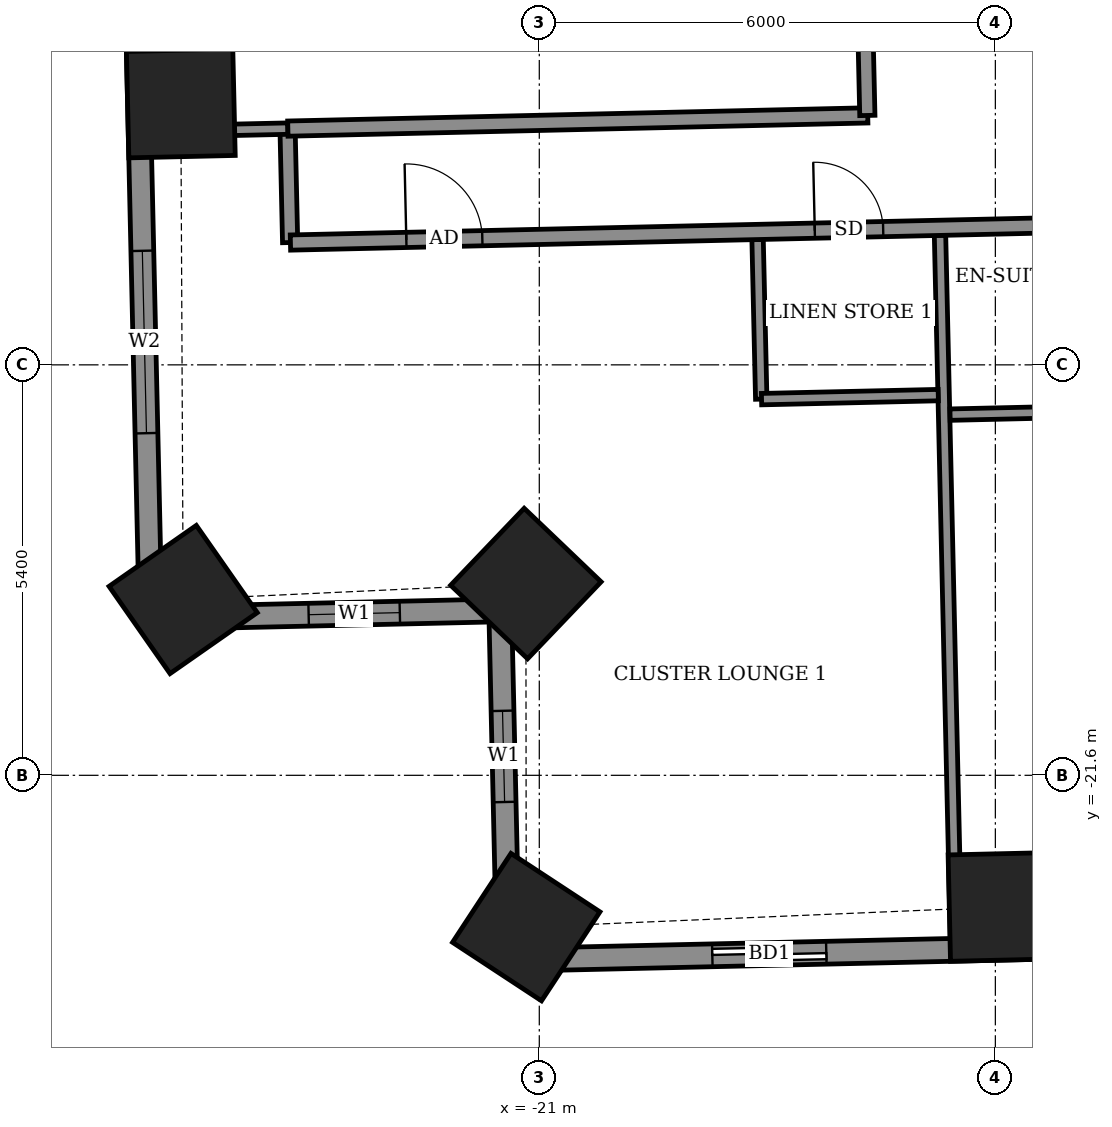
"""IFC4 building model, lengths in metres.
Left out: names, types, materials, properties, quantities, classifications, styles, units other than length and angle.
Written with IfcOpenShell. Run it as: python <this file> out.ifc"""

import sys

from ifc_helpers import new_model, si_unit, direction, frame, frame_2d, origin, origin_2d, place, context, subcontext, project, spatial, rectangle, extrude, element, fill, save


model = new_model("IFC4")
c1 = context("Model", 3, precision=1e-05, world=origin(), true_north=direction((0.0, 1.0)))
c2 = subcontext(c1, "Body", "Model", "MODEL_VIEW")
j1 = project(units=[si_unit("LENGTHUNIT", "METRE"), si_unit("PLANEANGLEUNIT", "RADIAN")], contexts=[c1])
p1 = place(None, origin())
s1 = spatial("IfcSite", under=j1, at=p1, CompositionType="ELEMENT")
p2 = place(p1, origin())
s2 = spatial("IfcBuilding", under=s1, at=p2, CompositionType="ELEMENT")
p3 = place(p2, frame((0.0, 0.0, 90.1)))
s3 = spatial("IfcBuildingStorey", under=s2, at=p3, CompositionType="ELEMENT", Elevation=90.1)
for number, where, z_axis, x_axis in (
    (1, (-25.716, -12.761, -0.55), (0.0, 0.0, 1.0), (0.023, -1.0, 0.0)),
    (2, (-25.685, -19.287, -0.55), (0.0, 0.0, 1.0), (0.573, -0.82, 0.0)),
    (3, (-21.177, -19.077, -0.55), (0.0, 0.0, 1.0), (0.723, -0.691, 0.0)),
    (4, (-21.172, -23.597, -0.55), (0.0, 0.0, 1.0), (0.836, -0.549, 0.0)),
    (5, (-14.906, -23.331, -0.55), (0.0, 0.0, 1.0), (1.0, 0.023, 0.0)),
):
    element("IfcColumn", number, at=place(p3, frame(where, z_axis=z_axis, x_axis=x_axis)), inside=s3, PredefinedType="COLUMN", context=c2, shape_type="SweptSolid", body=[
        extrude(rectangle(XDim=1.4, YDim=1.4, at=origin_2d()), origin(), (0.0, 0.0, 1.0), 3.6),
    ])
p4 = place(p3, frame((-26.424, -5.808, 0.0), z_axis=(0.0, 0.0, 1.0), x_axis=(0.022654755793, -0.999743348085, 0.0)))
e6 = element("IfcWall", 6, at=p4, inside=s3, PredefinedType="SOLIDWALL", context=c2, shape_type="SweptSolid", body=[
    extrude(rectangle(XDim=13.729, YDim=0.3, at=frame_2d((6.865, 0.0))), origin(), (0.0, 0.0, 1.0), 3.05),
])
p5 = place(p4, frame((2.761, 0.0, 0.0)))
e7 = element("IfcOpeningElement", 7, at=p5, cuts=e6, PredefinedType="OPENING", context=c2, shape_type="SweptSolid", body=[
    extrude(rectangle(XDim=1.5, YDim=2.4, at=frame_2d((0.75, 1.2))), frame((0.0, 0.16, 0.0), z_axis=(0.0, -1.0, 0.0), x_axis=(1.0, 0.0, 0.0)), (0.0, 0.0, 1.0), 0.32),
])
p6 = place(p4, frame((8.894, 0.0, 0.9)))
e8 = element("IfcOpeningElement", 8, at=p6, cuts=e6, PredefinedType="OPENING", context=c2, shape_type="SweptSolid", body=[
    extrude(rectangle(XDim=2.4, YDim=1.5, at=frame_2d((1.2, 0.75))), frame((0.0, 0.16, 0.0), z_axis=(0.0, -1.0, 0.0), x_axis=(1.0, 0.0, 0.0)), (0.0, 0.0, 1.0), 0.32),
])
p7 = place(p3, frame((-26.113, -19.534, 0.0), z_axis=(0.0, 0.0, 1.0), x_axis=(0.999744404568, 0.02260808559, 0.0)))
e9 = element("IfcWall", 9, at=p7, inside=s3, PredefinedType="SOLIDWALL", context=c2, shape_type="SweptSolid", body=[
    extrude(rectangle(XDim=4.6, YDim=0.3, at=frame_2d((2.3, 0.0))), origin(), (0.0, 0.0, 1.0), 2.55),
])
p8 = place(p7, frame((2.079, 0.0, 0.9)))
e10 = element("IfcOpeningElement", 10, at=p8, cuts=e9, PredefinedType="OPENING", context=c2, shape_type="SweptSolid", body=[
    extrude(rectangle(XDim=1.2, YDim=1.5, at=frame_2d((0.6, 0.75))), frame((0.0, 0.16, 0.0), z_axis=(0.0, -1.0, 0.0), x_axis=(1.0, 0.0, 0.0)), (0.0, 0.0, 1.0), 0.32),
])
p9 = place(p3, frame((-21.514, -19.43, 0.0), z_axis=(0.0, 0.0, 1.0), x_axis=(0.022820258049, -0.999739584003, 0.0)))
e11 = element("IfcWall", 11, at=p9, inside=s3, PredefinedType="SOLIDWALL", context=c2, shape_type="SweptSolid", body=[
    extrude(rectangle(XDim=4.6, YDim=0.3, at=frame_2d((2.3, 0.0))), origin(), (0.0, 0.0, 1.0), 2.55),
])
p10 = place(p9, frame((1.322, 0.0, 0.9)))
e12 = element("IfcOpeningElement", 12, at=p10, cuts=e11, PredefinedType="OPENING", context=c2, shape_type="SweptSolid", body=[
    extrude(rectangle(XDim=1.2, YDim=1.5, at=frame_2d((0.6, 0.75))), frame((0.0, 0.16, 0.0), z_axis=(0.0, -1.0, 0.0), x_axis=(1.0, 0.0, 0.0)), (0.0, 0.0, 1.0), 0.32),
])
p11 = place(p3, frame((-21.409, -24.029, 0.0), z_axis=(0.0, 0.0, 1.0), x_axis=(0.999742634032, 0.022686244721, 0.0)))
e13 = element("IfcWall", 13, at=p11, inside=s3, PredefinedType="SOLIDWALL", context=c2, shape_type="SweptSolid", body=[
    extrude(rectangle(XDim=46.372, YDim=0.3, at=frame_2d((23.186, 0.0))), origin(), (0.0, 0.0, 1.0), 3.05),
])
p12 = place(p11, frame((2.686, 0.0, 0.0)))
e14 = element("IfcOpeningElement", 14, at=p12, cuts=e13, PredefinedType="OPENING", context=c2, shape_type="SweptSolid", body=[
    extrude(rectangle(XDim=1.5, YDim=2.4, at=frame_2d((0.75, 1.2))), frame((0.0, 0.16, 0.0), z_axis=(0.0, -1.0, 0.0), x_axis=(1.0, 0.0, 0.0)), (0.0, 0.0, 1.0), 0.32),
])
p13 = place(p11, frame((7.959, 0.0, 0.0)))
e15 = element("IfcOpeningElement", 15, at=p13, cuts=e13, PredefinedType="OPENING", context=c2, shape_type="SweptSolid", body=[
    extrude(rectangle(XDim=1.5, YDim=2.4, at=frame_2d((0.75, 1.2))), frame((0.0, 0.16, 0.0), z_axis=(0.0, -1.0, 0.0), x_axis=(1.0, 0.0, 0.0)), (0.0, 0.0, 1.0), 0.32),
])
p14 = place(p11, frame((10.842, 0.0, 0.0)))
e16 = element("IfcOpeningElement", 16, at=p14, cuts=e13, PredefinedType="OPENING", context=c2, shape_type="SweptSolid", body=[
    extrude(rectangle(XDim=1.5, YDim=2.4, at=frame_2d((0.75, 1.2))), frame((0.0, 0.16, 0.0), z_axis=(0.0, -1.0, 0.0), x_axis=(1.0, 0.0, 0.0)), (0.0, 0.0, 1.0), 0.32),
])
p15 = place(p11, frame((16.3, 0.0, 0.0)))
e17 = element("IfcOpeningElement", 17, at=p15, cuts=e13, PredefinedType="OPENING", context=c2, shape_type="SweptSolid", body=[
    extrude(rectangle(XDim=1.5, YDim=2.4, at=frame_2d((0.75, 1.2))), frame((0.0, 0.16, 0.0), z_axis=(0.0, -1.0, 0.0), x_axis=(1.0, 0.0, 0.0)), (0.0, 0.0, 1.0), 0.32),
])
p16 = place(p11, frame((21.326, 0.0, 0.0)))
e18 = element("IfcOpeningElement", 18, at=p16, cuts=e13, PredefinedType="OPENING", context=c2, shape_type="SweptSolid", body=[
    extrude(rectangle(XDim=1.5, YDim=2.4, at=frame_2d((0.75, 1.2))), frame((0.0, 0.16, 0.0), z_axis=(0.0, -1.0, 0.0), x_axis=(1.0, 0.0, 0.0)), (0.0, 0.0, 1.0), 0.32),
])
p17 = place(p11, frame((24.21, 0.0, 0.0)))
e19 = element("IfcOpeningElement", 19, at=p17, cuts=e13, PredefinedType="OPENING", context=c2, shape_type="SweptSolid", body=[
    extrude(rectangle(XDim=1.5, YDim=2.4, at=frame_2d((0.75, 1.2))), frame((0.0, 0.16, 0.0), z_axis=(0.0, -1.0, 0.0), x_axis=(1.0, 0.0, 0.0)), (0.0, 0.0, 1.0), 0.32),
])
p18 = place(p11, frame((29.769, 0.0, 0.0)))
e20 = element("IfcOpeningElement", 20, at=p18, cuts=e13, PredefinedType="OPENING", context=c2, shape_type="SweptSolid", body=[
    extrude(rectangle(XDim=1.5, YDim=2.4, at=frame_2d((0.75, 1.2))), frame((0.0, 0.16, 0.0), z_axis=(0.0, -1.0, 0.0), x_axis=(1.0, 0.0, 0.0)), (0.0, 0.0, 1.0), 0.32),
])
p19 = place(p11, frame((34.819, 0.0, 0.0)))
e21 = element("IfcOpeningElement", 21, at=p19, cuts=e13, PredefinedType="OPENING", context=c2, shape_type="SweptSolid", body=[
    extrude(rectangle(XDim=1.5, YDim=2.4, at=frame_2d((0.75, 1.2))), frame((0.0, 0.16, 0.0), z_axis=(0.0, -1.0, 0.0), x_axis=(1.0, 0.0, 0.0)), (0.0, 0.0, 1.0), 0.32),
])
p20 = place(p11, frame((37.852, 0.0, 0.0)))
e22 = element("IfcOpeningElement", 22, at=p20, cuts=e13, PredefinedType="OPENING", context=c2, shape_type="SweptSolid", body=[
    extrude(rectangle(XDim=1.2, YDim=2.4, at=frame_2d((0.6, 1.2))), frame((0.0, 0.16, 0.0), z_axis=(0.0, -1.0, 0.0), x_axis=(1.0, 0.0, 0.0)), (0.0, 0.0, 1.0), 0.32),
])
p21 = place(p11, frame((42.373, 0.0, 0.9)))
e23 = element("IfcOpeningElement", 23, at=p21, cuts=e13, PredefinedType="OPENING", context=c2, shape_type="SweptSolid", body=[
    extrude(rectangle(XDim=2.4, YDim=1.5, at=frame_2d((1.2, 0.75))), frame((0.0, 0.16, 0.0), z_axis=(0.0, -1.0, 0.0), x_axis=(1.0, 0.0, 0.0)), (0.0, 0.0, 1.0), 0.32),
])
p22 = place(p3, frame((-15.518, -23.745, 0.0), z_axis=(0.0, 0.0, 1.0), x_axis=(-0.022697424684, 0.999742380272, 0.0)))
e24 = element("IfcWall", 24, at=p22, inside=s3, PredefinedType="PARTITIONING", context=c2, shape_type="SweptSolid", body=[
    extrude(rectangle(XDim=9.25, YDim=0.15, at=frame_2d((4.625, 0.0))), origin(), (0.0, 0.0, 1.0), 3.05),
])
p23 = place(p3, frame((-15.596, -16.855, 0.0), z_axis=(0.0, 0.0, 1.0), x_axis=(0.999740478815, 0.022781023197, 0.0)))
e25 = element("IfcWall", 25, at=p23, inside=s3, PredefinedType="PARTITIONING", context=c2, shape_type="SweptSolid", body=[
    extrude(rectangle(XDim=2.325, YDim=0.15, at=frame_2d((1.163, 0.0))), origin(), (0.0, 0.0, 1.0), 3.05),
])
p24 = place(p3, frame((-18.08, -16.651, 0.0), z_axis=(0.0, 0.0, 1.0), x_axis=(-0.022792727877, 0.999740212033, 0.0)))
e26 = element("IfcWall", 26, at=p24, inside=s3, PredefinedType="PARTITIONING", context=c2, shape_type="SweptSolid", body=[
    extrude(rectangle(XDim=2.099, YDim=0.15, at=frame_2d((1.05, 0.0))), origin(), (0.0, 0.0, 1.0), 3.05),
])
p25 = place(p3, frame((-18.076, -16.651, 0.0), z_axis=(0.0, 0.0, 1.0), x_axis=(0.999740478815, 0.022781023197, 0.0)))
e27 = element("IfcWall", 27, at=p25, inside=s3, PredefinedType="PARTITIONING", context=c2, shape_type="SweptSolid", body=[
    extrude(rectangle(XDim=2.325, YDim=0.15, at=frame_2d((1.163, 0.0))), origin(), (0.0, 0.0, 1.0), 3.05),
])
p26 = place(p3, frame((-24.278, -14.591, 0.0), z_axis=(0.0, 0.0, 1.0), x_axis=(-0.022632637625, 0.99974384905, 0.0)))
e28 = element("IfcWall", 28, at=p26, inside=s3, PredefinedType="PARTITIONING", context=c2, shape_type="SweptSolid", body=[
    extrude(rectangle(XDim=1.5, YDim=0.2, at=frame_2d((0.75, 0.0))), origin(), (0.0, 0.0, 1.0), 3.05),
])
p27 = place(p3, frame((-24.274, -14.591, 0.0), z_axis=(0.0, 0.0, 1.0), x_axis=(0.999742718753, 0.022682510909, 0.0)))
e29 = element("IfcWall", 29, at=p27, inside=s3, PredefinedType="PARTITIONING", context=c2, shape_type="SweptSolid", body=[
    extrude(rectangle(XDim=52.471, YDim=0.2, at=frame_2d((26.236, 0.0))), origin(), (0.0, 0.0, 1.0), 3.05),
])
p28 = place(p27, frame((1.525, 0.0, 0.0)))
e30 = element("IfcOpeningElement", 30, at=p28, cuts=e29, PredefinedType="OPENING", context=c2, shape_type="SweptSolid", body=[
    extrude(rectangle(XDim=1.0, YDim=2.1, at=frame_2d((0.5, 1.05))), frame((0.0, 0.11, 0.0), z_axis=(0.0, -1.0, 0.0), x_axis=(1.0, 0.0, 0.0)), (0.0, 0.0, 1.0), 0.22),
])
p29 = place(p27, frame((6.9, 0.0, 0.0)))
e31 = element("IfcOpeningElement", 31, at=p29, cuts=e29, PredefinedType="OPENING", context=c2, shape_type="SweptSolid", body=[
    extrude(rectangle(XDim=0.9, YDim=2.1, at=frame_2d((0.45, 1.05))), frame((0.0, 0.11, 0.0), z_axis=(0.0, -1.0, 0.0), x_axis=(1.0, 0.0, 0.0)), (0.0, 0.0, 1.0), 0.22),
])
p30 = place(p27, frame((11.575, 0.0, 0.0)))
e32 = element("IfcOpeningElement", 32, at=p30, cuts=e29, PredefinedType="OPENING", context=c2, shape_type="SweptSolid", body=[
    extrude(rectangle(XDim=0.9, YDim=2.1, at=frame_2d((0.45, 1.05))), frame((0.0, 0.11, 0.0), z_axis=(0.0, -1.0, 0.0), x_axis=(1.0, 0.0, 0.0)), (0.0, 0.0, 1.0), 0.22),
])
p31 = place(p27, frame((13.6, 0.0, 0.0)))
e33 = element("IfcOpeningElement", 33, at=p31, cuts=e29, PredefinedType="OPENING", context=c2, shape_type="SweptSolid", body=[
    extrude(rectangle(XDim=0.9, YDim=2.1, at=frame_2d((0.45, 1.05))), frame((0.0, 0.11, 0.0), z_axis=(0.0, -1.0, 0.0), x_axis=(1.0, 0.0, 0.0)), (0.0, 0.0, 1.0), 0.22),
])
p32 = place(p27, frame((20.45, 0.0, 0.0)))
e34 = element("IfcOpeningElement", 34, at=p32, cuts=e29, PredefinedType="OPENING", context=c2, shape_type="SweptSolid", body=[
    extrude(rectangle(XDim=0.9, YDim=2.1, at=frame_2d((0.45, 1.05))), frame((0.0, 0.11, 0.0), z_axis=(0.0, -1.0, 0.0), x_axis=(1.0, 0.0, 0.0)), (0.0, 0.0, 1.0), 0.22),
])
p33 = place(p27, frame((22.6, 0.0, 0.0)))
e35 = element("IfcOpeningElement", 35, at=p33, cuts=e29, PredefinedType="OPENING", context=c2, shape_type="SweptSolid", body=[
    extrude(rectangle(XDim=0.9, YDim=2.1, at=frame_2d((0.45, 1.05))), frame((0.0, 0.11, 0.0), z_axis=(0.0, -1.0, 0.0), x_axis=(1.0, 0.0, 0.0)), (0.0, 0.0, 1.0), 0.22),
])
p34 = place(p27, frame((29.475, 0.0, 0.0)))
e36 = element("IfcOpeningElement", 36, at=p34, cuts=e29, PredefinedType="OPENING", context=c2, shape_type="SweptSolid", body=[
    extrude(rectangle(XDim=0.9, YDim=2.1, at=frame_2d((0.45, 1.05))), frame((0.0, 0.11, 0.0), z_axis=(0.0, -1.0, 0.0), x_axis=(1.0, 0.0, 0.0)), (0.0, 0.0, 1.0), 0.22),
])
p35 = place(p27, frame((31.675, 0.0, 0.0)))
e37 = element("IfcOpeningElement", 37, at=p35, cuts=e29, PredefinedType="OPENING", context=c2, shape_type="SweptSolid", body=[
    extrude(rectangle(XDim=0.9, YDim=2.1, at=frame_2d((0.45, 1.05))), frame((0.0, 0.11, 0.0), z_axis=(0.0, -1.0, 0.0), x_axis=(1.0, 0.0, 0.0)), (0.0, 0.0, 1.0), 0.22),
])
p36 = place(p27, frame((38.675, 0.0, 0.0)))
e38 = element("IfcOpeningElement", 38, at=p36, cuts=e29, PredefinedType="OPENING", context=c2, shape_type="SweptSolid", body=[
    extrude(rectangle(XDim=0.9, YDim=2.1, at=frame_2d((0.45, 1.05))), frame((0.0, 0.11, 0.0), z_axis=(0.0, -1.0, 0.0), x_axis=(1.0, 0.0, 0.0)), (0.0, 0.0, 1.0), 0.22),
])
p37 = place(p27, frame((40.675, 0.0, 0.0)))
e39 = element("IfcOpeningElement", 39, at=p37, cuts=e29, PredefinedType="OPENING", context=c2, shape_type="SweptSolid", body=[
    extrude(rectangle(XDim=0.9, YDim=2.1, at=frame_2d((0.45, 1.05))), frame((0.0, 0.11, 0.0), z_axis=(0.0, -1.0, 0.0), x_axis=(1.0, 0.0, 0.0)), (0.0, 0.0, 1.0), 0.22),
])
p38 = place(p27, frame((50.436, 0.0, 0.0)))
e40 = element("IfcOpeningElement", 40, at=p38, cuts=e29, PredefinedType="OPENING", context=c2, shape_type="SweptSolid", body=[
    extrude(rectangle(XDim=1.0, YDim=2.1, at=frame_2d((0.5, 1.05))), frame((0.0, 0.11, 0.0), z_axis=(0.0, -1.0, 0.0), x_axis=(1.0, 0.0, 0.0)), (0.0, 0.0, 1.0), 0.22),
])
p39 = place(p27, frame((45.45, 0.0, 0.0)))
e41 = element("IfcOpeningElement", 41, at=p39, cuts=e29, PredefinedType="OPENING", context=c2, shape_type="SweptSolid", body=[
    extrude(rectangle(XDim=0.9, YDim=2.1, at=frame_2d((0.45, 1.05))), frame((0.0, 0.11, 0.0), z_axis=(0.0, -1.0, 0.0), x_axis=(1.0, 0.0, 0.0)), (0.0, 0.0, 1.0), 0.22),
])
p40 = place(p3, frame((-26.108, -13.132, 0.0), z_axis=(0.0, 0.0, 1.0), x_axis=(0.999752642043, 0.022240834685, 0.0)))
e42 = element("IfcWall", 42, at=p40, inside=s3, PredefinedType="PARTITIONING", context=c2, shape_type="SweptSolid", body=[
    extrude(rectangle(XDim=1.8, YDim=0.15, at=frame_2d((0.9, 0.0))), origin(), (0.0, 0.0, 1.0), 3.05),
])
p41 = place(p3, frame((-24.308, -13.092, 0.0), z_axis=(0.0, 0.0, 1.0), x_axis=(0.999739800004, 0.022810793222, 0.0)))
e43 = element("IfcWall", 43, at=p41, inside=s3, PredefinedType="PARTITIONING", context=c2, shape_type="SweptSolid", body=[
    extrude(rectangle(XDim=7.631, YDim=0.2, at=frame_2d((3.815, 0.0))), origin(), (0.0, 0.0, 1.0), 3.05),
])
p42 = place(p3, frame((-16.684, -12.919, 0.0), z_axis=(0.0, 0.0, 1.0), x_axis=(-0.022706151961, 0.999742182097, 0.0)))
e44 = element("IfcWall", 44, at=p42, inside=s3, PredefinedType="PARTITIONING", context=c2, shape_type="SweptSolid", body=[
    extrude(rectangle(XDim=25.45, YDim=0.2, at=frame_2d((12.725, 0.0))), origin(), (0.0, 0.0, 1.0), 3.05),
])
p43 = place(p42, frame((23.938, 0.0, 0.0)))
e45 = element("IfcOpeningElement", 45, at=p43, cuts=e44, PredefinedType="OPENING", context=c2, shape_type="SweptSolid", body=[
    extrude(rectangle(XDim=1.0, YDim=2.1, at=frame_2d((0.5, 1.05))), frame((0.0, 0.11, 0.0), z_axis=(0.0, -1.0, 0.0), x_axis=(1.0, 0.0, 0.0)), (0.0, 0.0, 1.0), 0.22),
])
p44 = place(p42, frame((21.775, 0.0, 0.0)))
e46 = element("IfcOpeningElement", 46, at=p44, cuts=e44, PredefinedType="OPENING", context=c2, shape_type="SweptSolid", body=[
    extrude(rectangle(XDim=0.9, YDim=2.1, at=frame_2d((0.45, 1.05))), frame((0.0, 0.11, 0.0), z_axis=(0.0, -1.0, 0.0), x_axis=(1.0, 0.0, 0.0)), (0.0, 0.0, 1.0), 0.22),
])
p45 = place(p42, frame((16.975, 0.0, 0.0)))
e47 = element("IfcOpeningElement", 47, at=p45, cuts=e44, PredefinedType="OPENING", context=c2, shape_type="SweptSolid", body=[
    extrude(rectangle(XDim=1.0, YDim=2.1, at=frame_2d((0.5, 1.05))), frame((0.0, 0.11, 0.0), z_axis=(0.0, -1.0, 0.0), x_axis=(1.0, 0.0, 0.0)), (0.0, 0.0, 1.0), 0.22),
])
p46 = place(p42, frame((19.275, 0.0, 0.0)))
e48 = element("IfcOpeningElement", 48, at=p46, cuts=e44, PredefinedType="OPENING", context=c2, shape_type="SweptSolid", body=[
    extrude(rectangle(XDim=0.9, YDim=2.1, at=frame_2d((0.45, 1.05))), frame((0.0, 0.11, 0.0), z_axis=(0.0, -1.0, 0.0), x_axis=(1.0, 0.0, 0.0)), (0.0, 0.0, 1.0), 0.22),
])
p47 = place(p42, frame((15.075, 0.0, 0.0)))
e49 = element("IfcOpeningElement", 49, at=p47, cuts=e44, PredefinedType="OPENING", context=c2, shape_type="SweptSolid", body=[
    extrude(rectangle(XDim=1.0, YDim=2.1, at=frame_2d((0.5, 1.05))), frame((0.0, 0.11, 0.0), z_axis=(0.0, -1.0, 0.0), x_axis=(1.0, 0.0, 0.0)), (0.0, 0.0, 1.0), 0.22),
])
p48 = place(p42, frame((12.975, 0.0, 0.0)))
e50 = element("IfcOpeningElement", 50, at=p48, cuts=e44, PredefinedType="OPENING", context=c2, shape_type="SweptSolid", body=[
    extrude(rectangle(XDim=0.9, YDim=2.1, at=frame_2d((0.45, 1.05))), frame((0.0, 0.11, 0.0), z_axis=(0.0, -1.0, 0.0), x_axis=(1.0, 0.0, 0.0)), (0.0, 0.0, 1.0), 0.22),
])
p49 = place(p42, frame((10.55, 0.0, 0.0)))
e51 = element("IfcOpeningElement", 51, at=p49, cuts=e44, PredefinedType="OPENING", context=c2, shape_type="SweptSolid", body=[
    extrude(rectangle(XDim=1.0, YDim=2.1, at=frame_2d((0.5, 1.05))), frame((0.0, 0.11, 0.0), z_axis=(0.0, -1.0, 0.0), x_axis=(1.0, 0.0, 0.0)), (0.0, 0.0, 1.0), 0.22),
])
p50 = place(p42, frame((8.125, 0.0, 0.0)))
e52 = element("IfcOpeningElement", 52, at=p50, cuts=e44, PredefinedType="OPENING", context=c2, shape_type="SweptSolid", body=[
    extrude(rectangle(XDim=0.9, YDim=2.1, at=frame_2d((0.45, 1.05))), frame((0.0, 0.11, 0.0), z_axis=(0.0, -1.0, 0.0), x_axis=(1.0, 0.0, 0.0)), (0.0, 0.0, 1.0), 0.22),
])
p51 = place(p42, frame((1.737, 0.0, 0.0)))
e53 = element("IfcOpeningElement", 53, at=p51, cuts=e44, PredefinedType="OPENING", context=c2, shape_type="SweptSolid", body=[
    extrude(rectangle(XDim=1.0, YDim=2.1, at=frame_2d((0.5, 1.05))), frame((0.0, 0.11, 0.0), z_axis=(0.0, -1.0, 0.0), x_axis=(1.0, 0.0, 0.0)), (0.0, 0.0, 1.0), 0.22),
])
p52 = place(p42, frame((5.425, 0.0, 0.0)))
e54 = element("IfcOpeningElement", 54, at=p52, cuts=e44, PredefinedType="OPENING", context=c2, shape_type="SweptSolid", body=[
    extrude(rectangle(XDim=0.9, YDim=2.1, at=frame_2d((0.45, 1.05))), frame((0.0, 0.11, 0.0), z_axis=(0.0, -1.0, 0.0), x_axis=(1.0, 0.0, 0.0)), (0.0, 0.0, 1.0), 0.22),
])
p53 = place(p6, origin())
e55 = element("IfcWindow", 55, at=p53, inside=s3, PartitioningType="DOUBLE_PANEL_VERTICAL", PredefinedType="WINDOW", context=c2, shape_type="SweptSolid", body=[
    extrude(rectangle(XDim=2.4, YDim=1.5, at=frame_2d((1.2, 0.75))), frame((0.0, 0.03, 0.0), z_axis=(0.0, -1.0, 0.0), x_axis=(1.0, 0.0, 0.0)), (0.0, 0.0, 1.0), 0.06),
])
fill(e8, e55)
p54 = place(p8, origin())
e56 = element("IfcWindow", 56, at=p54, inside=s3, PartitioningType="SINGLE_PANEL", PredefinedType="WINDOW", context=c2, shape_type="SweptSolid", body=[
    extrude(rectangle(XDim=1.2, YDim=1.5, at=frame_2d((0.6, 0.75))), frame((0.0, 0.03, 0.0), z_axis=(0.0, -1.0, 0.0), x_axis=(1.0, 0.0, 0.0)), (0.0, 0.0, 1.0), 0.06),
])
fill(e10, e56)
p55 = place(p10, origin())
e57 = element("IfcWindow", 57, at=p55, inside=s3, PartitioningType="SINGLE_PANEL", PredefinedType="WINDOW", context=c2, shape_type="SweptSolid", body=[
    extrude(rectangle(XDim=1.2, YDim=1.5, at=frame_2d((0.6, 0.75))), frame((0.0, 0.03, 0.0), z_axis=(0.0, -1.0, 0.0), x_axis=(1.0, 0.0, 0.0)), (0.0, 0.0, 1.0), 0.06),
])
fill(e12, e57)
p56 = place(p12, origin())
e58 = element("IfcDoor", 58, at=p56, inside=s3, OperationType="SLIDING_TO_LEFT", PredefinedType="DOOR", context=c2, shape_type="SweptSolid", body=[
    extrude(rectangle(XDim=1.5, YDim=2.4, at=frame_2d((0.75, 1.2))), frame((0.0, 0.025, 0.0), z_axis=(0.0, -1.0, 0.0), x_axis=(1.0, 0.0, 0.0)), (0.0, 0.0, 1.0), 0.05),
])
fill(e14, e58)
p57 = place(p28, origin())
e59 = element("IfcDoor", 59, at=p57, inside=s3, OperationType="SINGLE_SWING_LEFT", PredefinedType="DOOR", context=c2, shape_type="SweptSolid", body=[
    extrude(rectangle(XDim=1.0, YDim=2.1, at=frame_2d((0.5, 1.05))), frame((0.0, 0.025, 0.0), z_axis=(0.0, -1.0, 0.0), x_axis=(1.0, 0.0, 0.0)), (0.0, 0.0, 1.0), 0.05),
])
fill(e30, e59)
p58 = place(p29, origin())
e60 = element("IfcDoor", 60, at=p58, inside=s3, OperationType="SINGLE_SWING_LEFT", PredefinedType="DOOR", context=c2, shape_type="SweptSolid", body=[
    extrude(rectangle(XDim=0.9, YDim=2.1, at=frame_2d((0.45, 1.05))), frame((0.0, 0.025, 0.0), z_axis=(0.0, -1.0, 0.0), x_axis=(1.0, 0.0, 0.0)), (0.0, 0.0, 1.0), 0.05),
])
fill(e31, e60)
save(model, sys.argv[1])
